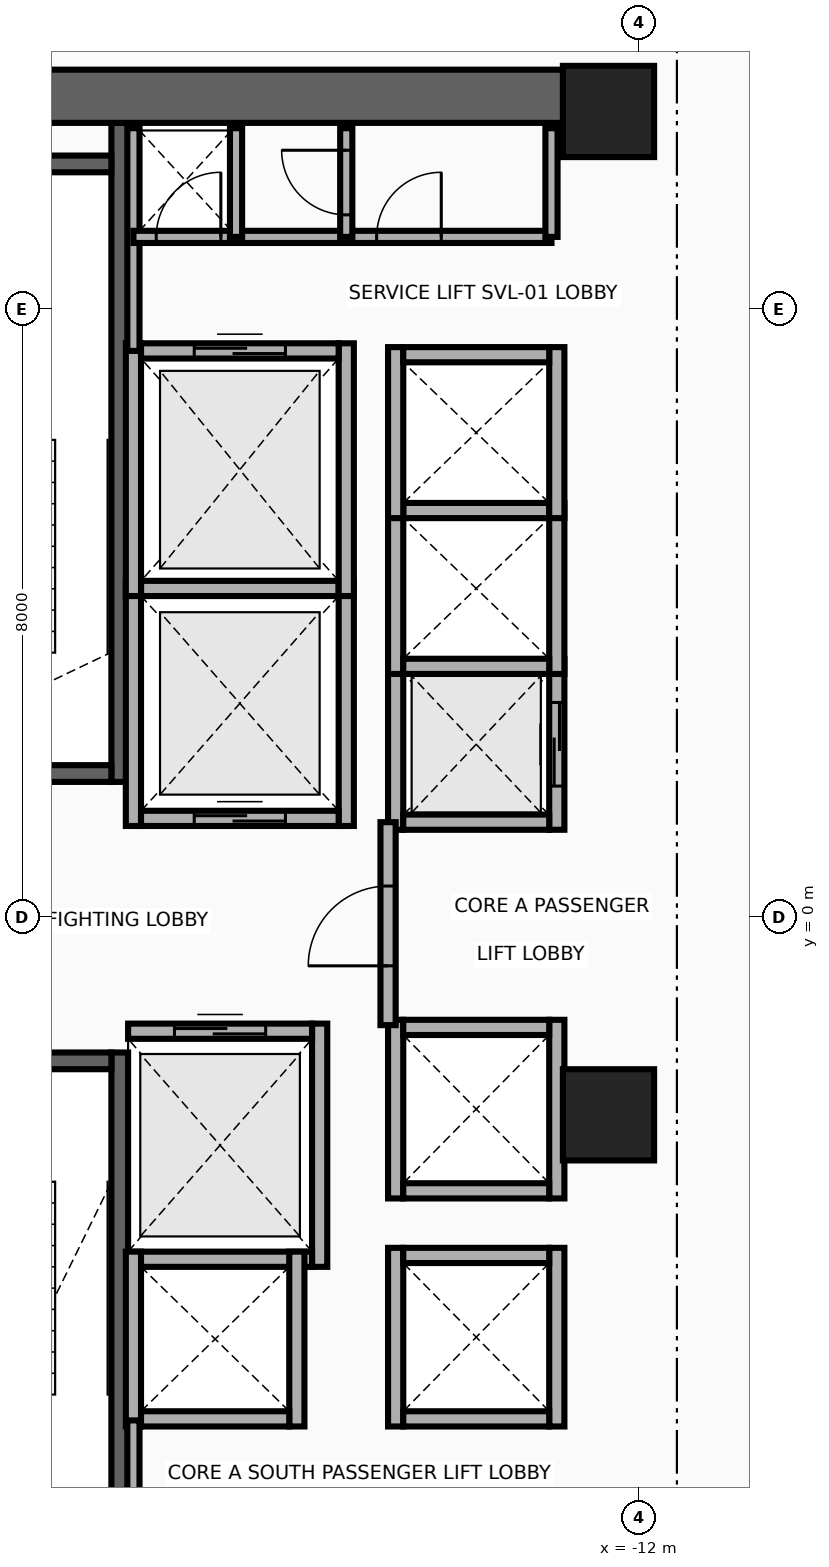
"""IFC4 building model, lengths in metres.
Left out: names, types, materials, properties, quantities, classifications, styles, units other than length and angle.
Written with IfcOpenShell. Run it as: python <this file> out.ifc"""

import sys

from ifc_helpers import new_model, si_unit, direction, frame, frame_2d, origin, origin_2d, place, context, subcontext, project, spatial, rectangle, extrude, source, transform, mapped, element, fill, save


model = new_model("IFC4")
c1 = context("Model", 3, precision=1e-05, world=origin(), true_north=direction((0.0, 1.0)))
c2 = subcontext(c1, "Body", "Model", "MODEL_VIEW")
j1 = project(units=[si_unit("LENGTHUNIT", "METRE"), si_unit("PLANEANGLEUNIT", "RADIAN")], contexts=[c1])
p1 = place(None, origin())
s1 = spatial("IfcSite", under=j1, at=p1, CompositionType="ELEMENT")
p2 = place(p1, origin())
s2 = spatial("IfcBuilding", under=s1, at=p2, CompositionType="ELEMENT")
p3 = place(p2, frame((0.0, 0.0, 105.7)))
s3 = spatial("IfcBuildingStorey", under=s2, at=p3, CompositionType="ELEMENT", Elevation=105.7)
p4 = place(p3, frame((-18.83, 1.78, 0.0), z_axis=(0.0, 0.0, 1.0), x_axis=(0.0, 1.0, 0.0)))
e1 = element("IfcWall", 1, at=p4, inside=s3, PredefinedType="SHEAR", context=c2, shape_type="SweptSolid", body=[
    extrude(rectangle(XDim=8.67, YDim=0.22, at=frame_2d((4.335, 0.0))), origin(), (0.0, 0.0, 1.0), 3.46),
])
p5 = place(p3, frame((-22.05, 1.89, 0.0), z_axis=(0.0, 0.0, 1.0), x_axis=(1.0, 0.0, 0.0)))
e2 = element("IfcWall", 2, at=p5, inside=s3, PredefinedType="SHEAR", context=c2, shape_type="SweptSolid", body=[
    extrude(rectangle(XDim=3.11, YDim=0.22, at=frame_2d((1.555, 0.0))), origin(), (0.0, 0.0, 1.0), 3.46),
])
p6 = place(p5, frame((1.0, 0.0, 0.0)))
e3 = element("IfcOpeningElement", 3, at=p6, cuts=e2, PredefinedType="OPENING", context=c2, shape_type="SweptSolid", body=[
    extrude(rectangle(XDim=1.1, YDim=2.15, at=frame_2d((0.55, 1.075))), frame((0.0, 0.125, 0.0), z_axis=(0.0, -1.0, 0.0), x_axis=(1.0, 0.0, 0.0)), (0.0, 0.0, 1.0), 0.25),
])
p7 = place(p3, frame((-22.05, 9.91, 0.0), z_axis=(0.0, 0.0, 1.0), x_axis=(1.0, 0.0, 0.0)))
e4 = element("IfcWall", 4, at=p7, inside=s3, PredefinedType="SHEAR", context=c2, shape_type="SweptSolid", body=[
    extrude(rectangle(XDim=3.11, YDim=0.22, at=frame_2d((1.555, 0.0))), origin(), (0.0, 0.0, 1.0), 3.46),
])
p8 = place(p3, frame((-18.83, -10.45, 0.0), z_axis=(0.0, 0.0, 1.0), x_axis=(0.0, 1.0, 0.0)))
e5 = element("IfcWall", 5, at=p8, inside=s3, PredefinedType="SHEAR", context=c2, shape_type="SweptSolid", body=[
    extrude(rectangle(XDim=8.67, YDim=0.22, at=frame_2d((4.335, 0.0))), origin(), (0.0, 0.0, 1.0), 3.46),
])
p9 = place(p3, frame((-22.05, -1.89, 0.0), z_axis=(0.0, 0.0, 1.0), x_axis=(1.0, 0.0, 0.0)))
e6 = element("IfcWall", 6, at=p9, inside=s3, PredefinedType="SHEAR", context=c2, shape_type="SweptSolid", body=[
    extrude(rectangle(XDim=3.11, YDim=0.22, at=frame_2d((1.555, 0.0))), origin(), (0.0, 0.0, 1.0), 3.46),
])
p10 = place(p9, frame((1.0, 0.0, 0.0)))
e7 = element("IfcOpeningElement", 7, at=p10, cuts=e6, PredefinedType="OPENING", context=c2, shape_type="SweptSolid", body=[
    extrude(rectangle(XDim=1.1, YDim=2.15, at=frame_2d((0.55, 1.075))), frame((0.0, 0.125, 0.0), z_axis=(0.0, -1.0, 0.0), x_axis=(1.0, 0.0, 0.0)), (0.0, 0.0, 1.0), 0.25),
])
p11 = place(p3, frame((-22.65, 10.8, 0.0), z_axis=(0.0, 0.0, 1.0), x_axis=(1.0, 0.0, 0.0)))
e8 = element("IfcWall", 8, at=p11, inside=s3, PredefinedType="SHEAR", context=c2, shape_type="SweptSolid", body=[
    extrude(rectangle(XDim=10.25, YDim=0.7, at=frame_2d((5.125, 0.0))), origin(), (0.0, 0.0, 1.0), 3.46),
])
m1 = source(origin(), c2, "Body", "SweptSolid", [
    extrude(rectangle(XDim=1.2, YDim=1.2, at=origin_2d()), origin(), (0.0, 0.0, 1.0), 3.7),
])
for number, where, z_axis, x_axis in (
    (9, (-12.4, -2.6, 0.0), (0.0, 0.0, 1.0), (1.0, 0.0, 0.0)),
    (10, (-12.4, 10.6, 0.0), (0.0, 0.0, 1.0), (1.0, 0.0, 0.0)),
):
    element("IfcColumn", number, at=place(p3, frame(where, z_axis=z_axis, x_axis=x_axis)), inside=s3, PredefinedType="COLUMN", context=c2, shape_type="MappedRepresentation", body=[
        mapped(m1, transform((0.0, 0.0, 0.0), x_axis=(1.0, 0.0, 0.0), y_axis=(0.0, 1.0, 0.0), z_axis=(0.0, 0.0, 1.0), scale=1.0)),
    ])
for number, where, z_axis, x_axis in (
    (11, (-18.65, 1.2, 0.0), (0.0, 0.0, 1.0), (0.0, 1.0, 0.0)),
    (12, (-15.85, 1.2, 0.0), (0.0, 0.0, 1.0), (0.0, 1.0, 0.0)),
):
    element("IfcWall", number, at=place(p3, frame(where, z_axis=z_axis, x_axis=x_axis)), inside=s3, PredefinedType="MOVABLE", context=c2, shape_type="SweptSolid", body=[
        extrude(rectangle(XDim=3.225, YDim=0.2, at=frame_2d((1.613, 0.0))), origin(), (0.0, 0.0, 1.0), 3.46),
    ])
p12 = place(p3, frame((-18.55, 1.3, 0.0), z_axis=(0.0, 0.0, 1.0), x_axis=(1.0, 0.0, 0.0)))
e13 = element("IfcWall", 13, at=p12, inside=s3, PredefinedType="MOVABLE", context=c2, shape_type="SweptSolid", body=[
    extrude(rectangle(XDim=2.6, YDim=0.2, at=frame_2d((1.3, 0.0))), origin(), (0.0, 0.0, 1.0), 3.46),
])
p13 = place(p12, frame((0.7, 0.0, 0.0)))
e14 = element("IfcOpeningElement", 14, at=p13, cuts=e13, PredefinedType="OPENING", context=c2, shape_type="SweptSolid", body=[
    extrude(rectangle(XDim=1.2, YDim=2.1, at=frame_2d((0.6, 1.05))), frame((0.0, 0.115, 0.0), z_axis=(0.0, -1.0, 0.0), x_axis=(1.0, 0.0, 0.0)), (0.0, 0.0, 1.0), 0.23),
])
p14 = place(p3, frame((-18.55, 4.325, 0.0), z_axis=(0.0, 0.0, 1.0), x_axis=(1.0, 0.0, 0.0)))
e15 = element("IfcWall", 15, at=p14, inside=s3, PredefinedType="MOVABLE", context=c2, shape_type="SweptSolid", body=[
    extrude(rectangle(XDim=2.6, YDim=0.2, at=frame_2d((1.3, 0.0))), origin(), (0.0, 0.0, 1.0), 3.46),
])
p15 = place(p3, frame((-16.2, -4.6, 0.0), z_axis=(0.0, 0.0, 1.0), x_axis=(0.0, 1.0, 0.0)))
e16 = element("IfcWall", 16, at=p15, inside=s3, PredefinedType="MOVABLE", context=c2, shape_type="SweptSolid", body=[
    extrude(rectangle(XDim=3.2, YDim=0.2, at=frame_2d((1.6, 0.0))), origin(), (0.0, 0.0, 1.0), 3.46),
])
p16 = place(p3, frame((-18.72, -4.5, 0.0), z_axis=(0.0, 0.0, 1.0), x_axis=(1.0, 0.0, 0.0)))
e17 = element("IfcWall", 17, at=p16, inside=s3, PredefinedType="MOVABLE", context=c2, shape_type="SweptSolid", body=[
    extrude(rectangle(XDim=2.42, YDim=0.2, at=frame_2d((1.21, 0.0))), origin(), (0.0, 0.0, 1.0), 3.46),
])
p17 = place(p3, frame((-18.72, -1.5, 0.0), z_axis=(0.0, 0.0, 1.0), x_axis=(1.0, 0.0, 0.0)))
e18 = element("IfcWall", 18, at=p17, inside=s3, PredefinedType="MOVABLE", context=c2, shape_type="SweptSolid", body=[
    extrude(rectangle(XDim=2.42, YDim=0.2, at=frame_2d((1.21, 0.0))), origin(), (0.0, 0.0, 1.0), 3.46),
])
p18 = place(p17, frame((0.61, 0.0, 0.0)))
e19 = element("IfcOpeningElement", 19, at=p18, cuts=e18, PredefinedType="OPENING", context=c2, shape_type="SweptSolid", body=[
    extrude(rectangle(XDim=1.2, YDim=2.1, at=frame_2d((0.6, 1.05))), frame((0.0, 0.115, 0.0), z_axis=(0.0, -1.0, 0.0), x_axis=(1.0, 0.0, 0.0)), (0.0, 0.0, 1.0), 0.23),
])
for number, where, z_axis, x_axis in (
    (20, (-18.65, 4.225, 0.0), (0.0, 0.0, 1.0), (0.0, 1.0, 0.0)),
    (21, (-15.85, 4.225, 0.0), (0.0, 0.0, 1.0), (0.0, 1.0, 0.0)),
):
    element("IfcWall", number, at=place(p3, frame(where, z_axis=z_axis, x_axis=x_axis)), inside=s3, PredefinedType="MOVABLE", context=c2, shape_type="SweptSolid", body=[
        extrude(rectangle(XDim=3.325, YDim=0.2, at=frame_2d((1.663, 0.0))), origin(), (0.0, 0.0, 1.0), 3.46),
    ])
p19 = place(p3, frame((-18.55, 7.45, 0.0), z_axis=(0.0, 0.0, 1.0), x_axis=(1.0, 0.0, 0.0)))
e22 = element("IfcWall", 22, at=p19, inside=s3, PredefinedType="MOVABLE", context=c2, shape_type="SweptSolid", body=[
    extrude(rectangle(XDim=2.6, YDim=0.2, at=frame_2d((1.3, 0.0))), origin(), (0.0, 0.0, 1.0), 3.46),
])
p20 = place(p19, frame((0.7, 0.0, 0.0)))
e23 = element("IfcOpeningElement", 23, at=p20, cuts=e22, PredefinedType="OPENING", context=c2, shape_type="SweptSolid", body=[
    extrude(rectangle(XDim=1.2, YDim=2.1, at=frame_2d((0.6, 1.05))), frame((0.0, 0.115, 0.0), z_axis=(0.0, -1.0, 0.0), x_axis=(1.0, 0.0, 0.0)), (0.0, 0.0, 1.0), 0.23),
])
for number, where, z_axis, x_axis in (
    (24, (-15.2, -6.7, 0.0), (0.0, 0.0, 1.0), (0.0, 1.0, 0.0)),
    (25, (-13.08, -6.7, 0.0), (0.0, 0.0, 1.0), (0.0, 1.0, 0.0)),
):
    element("IfcWall", number, at=place(p3, frame(where, z_axis=z_axis, x_axis=x_axis)), inside=s3, PredefinedType="MOVABLE", context=c2, shape_type="SweptSolid", body=[
        extrude(rectangle(XDim=2.35, YDim=0.2, at=frame_2d((1.175, 0.0))), origin(), (0.0, 0.0, 1.0), 3.46),
    ])
for number, where, z_axis, x_axis in (
    (26, (-15.1, -6.6, 0.0), (0.0, 0.0, 1.0), (1.0, 0.0, 0.0)),
    (27, (-15.1, -4.45, 0.0), (0.0, 0.0, 1.0), (1.0, 0.0, 0.0)),
):
    element("IfcWall", number, at=place(p3, frame(where, z_axis=z_axis, x_axis=x_axis)), inside=s3, PredefinedType="MOVABLE", context=c2, shape_type="SweptSolid", body=[
        extrude(rectangle(XDim=1.92, YDim=0.2, at=frame_2d((0.96, 0.0))), origin(), (0.0, 0.0, 1.0), 3.46),
    ])
p21 = place(p3, frame((-15.2, 1.15, 0.0), z_axis=(0.0, 0.0, 1.0), x_axis=(0.0, 1.0, 0.0)))
e28 = element("IfcWall", 28, at=p21, inside=s3, PredefinedType="MOVABLE", context=c2, shape_type="SweptSolid", body=[
    extrude(rectangle(XDim=2.25, YDim=0.2, at=frame_2d((1.125, 0.0))), origin(), (0.0, 0.0, 1.0), 3.46),
])
p22 = place(p3, frame((-13.08, 1.15, 0.0), z_axis=(0.0, 0.0, 1.0), x_axis=(0.0, 1.0, 0.0)))
e29 = element("IfcWall", 29, at=p22, inside=s3, PredefinedType="MOVABLE", context=c2, shape_type="SweptSolid", body=[
    extrude(rectangle(XDim=2.25, YDim=0.2, at=frame_2d((1.125, 0.0))), origin(), (0.0, 0.0, 1.0), 3.46),
])
p23 = place(p22, frame((0.575, 0.0, 0.0)))
e30 = element("IfcOpeningElement", 30, at=p23, cuts=e29, PredefinedType="OPENING", context=c2, shape_type="SweptSolid", body=[
    extrude(rectangle(XDim=1.1, YDim=2.1, at=frame_2d((0.55, 1.05))), frame((0.0, 0.115, 0.0), z_axis=(0.0, -1.0, 0.0), x_axis=(1.0, 0.0, 0.0)), (0.0, 0.0, 1.0), 0.23),
])
p24 = place(p3, frame((-15.1, 1.25, 0.0), z_axis=(0.0, 0.0, 1.0), x_axis=(1.0, 0.0, 0.0)))
e31 = element("IfcWall", 31, at=p24, inside=s3, PredefinedType="MOVABLE", context=c2, shape_type="SweptSolid", body=[
    extrude(rectangle(XDim=1.92, YDim=0.2, at=frame_2d((0.96, 0.0))), origin(), (0.0, 0.0, 1.0), 3.46),
])
for number, where, z_axis, x_axis in (
    (32, (-15.2, 3.2, 0.0), (0.0, 0.0, 1.0), (0.0, 1.0, 0.0)),
    (33, (-13.08, 3.2, 0.0), (0.0, 0.0, 1.0), (0.0, 1.0, 0.0)),
):
    element("IfcWall", number, at=place(p3, frame(where, z_axis=z_axis, x_axis=x_axis)), inside=s3, PredefinedType="MOVABLE", context=c2, shape_type="SweptSolid", body=[
        extrude(rectangle(XDim=2.25, YDim=0.2, at=frame_2d((1.125, 0.0))), origin(), (0.0, 0.0, 1.0), 3.46),
    ])
for number, where, z_axis, x_axis in (
    (34, (-15.1, 3.3, 0.0), (0.0, 0.0, 1.0), (1.0, 0.0, 0.0)),
    (35, (-15.1, 5.35, 0.0), (0.0, 0.0, 1.0), (1.0, 0.0, 0.0)),
):
    element("IfcWall", number, at=place(p3, frame(where, z_axis=z_axis, x_axis=x_axis)), inside=s3, PredefinedType="MOVABLE", context=c2, shape_type="SweptSolid", body=[
        extrude(rectangle(XDim=1.92, YDim=0.2, at=frame_2d((0.96, 0.0))), origin(), (0.0, 0.0, 1.0), 3.46),
    ])
for number, where, z_axis, x_axis in (
    (36, (-15.2, 5.25, 0.0), (0.0, 0.0, 1.0), (0.0, 1.0, 0.0)),
    (37, (-13.08, 5.25, 0.0), (0.0, 0.0, 1.0), (0.0, 1.0, 0.0)),
):
    element("IfcWall", number, at=place(p3, frame(where, z_axis=z_axis, x_axis=x_axis)), inside=s3, PredefinedType="MOVABLE", context=c2, shape_type="SweptSolid", body=[
        extrude(rectangle(XDim=2.25, YDim=0.2, at=frame_2d((1.125, 0.0))), origin(), (0.0, 0.0, 1.0), 3.46),
    ])
p25 = place(p3, frame((-15.1, 7.4, 0.0), z_axis=(0.0, 0.0, 1.0), x_axis=(1.0, 0.0, 0.0)))
e38 = element("IfcWall", 38, at=p25, inside=s3, PredefinedType="MOVABLE", context=c2, shape_type="SweptSolid", body=[
    extrude(rectangle(XDim=1.92, YDim=0.2, at=frame_2d((0.96, 0.0))), origin(), (0.0, 0.0, 1.0), 3.46),
])
for number, where, z_axis, x_axis in (
    (39, (-18.65, -6.7, 0.0), (0.0, 0.0, 1.0), (0.0, 1.0, 0.0)),
    (40, (-16.5, -6.7, 0.0), (0.0, 0.0, 1.0), (0.0, 1.0, 0.0)),
):
    element("IfcWall", number, at=place(p3, frame(where, z_axis=z_axis, x_axis=x_axis)), inside=s3, PredefinedType="MOVABLE", context=c2, shape_type="SweptSolid", body=[
        extrude(rectangle(XDim=2.3, YDim=0.2, at=frame_2d((1.15, 0.0))), origin(), (0.0, 0.0, 1.0), 3.46),
    ])
p26 = place(p3, frame((-18.55, -6.6, 0.0), z_axis=(0.0, 0.0, 1.0), x_axis=(1.0, 0.0, 0.0)))
e41 = element("IfcWall", 41, at=p26, inside=s3, PredefinedType="MOVABLE", context=c2, shape_type="SweptSolid", body=[
    extrude(rectangle(XDim=1.95, YDim=0.2, at=frame_2d((0.975, 0.0))), origin(), (0.0, 0.0, 1.0), 3.46),
])
for number, where, z_axis, x_axis in (
    (42, (-15.2, -3.7, 0.0), (0.0, 0.0, 1.0), (0.0, 1.0, 0.0)),
    (43, (-13.08, -3.7, 0.0), (0.0, 0.0, 1.0), (0.0, 1.0, 0.0)),
):
    element("IfcWall", number, at=place(p3, frame(where, z_axis=z_axis, x_axis=x_axis)), inside=s3, PredefinedType="MOVABLE", context=c2, shape_type="SweptSolid", body=[
        extrude(rectangle(XDim=2.35, YDim=0.2, at=frame_2d((1.175, 0.0))), origin(), (0.0, 0.0, 1.0), 3.46),
    ])
for number, where, z_axis, x_axis in (
    (44, (-15.1, -3.6, 0.0), (0.0, 0.0, 1.0), (1.0, 0.0, 0.0)),
    (45, (-15.1, -1.45, 0.0), (0.0, 0.0, 1.0), (1.0, 0.0, 0.0)),
):
    element("IfcWall", number, at=place(p3, frame(where, z_axis=z_axis, x_axis=x_axis)), inside=s3, PredefinedType="MOVABLE", context=c2, shape_type="SweptSolid", body=[
        extrude(rectangle(XDim=1.92, YDim=0.2, at=frame_2d((0.96, 0.0))), origin(), (0.0, 0.0, 1.0), 3.46),
    ])
p27 = place(p3, frame((-15.3, -1.42, 0.0), z_axis=(0.0, 0.0, 1.0), x_axis=(0.0, 1.0, 0.0)))
e46 = element("IfcWall", 46, at=p27, inside=s3, PredefinedType="PARTITIONING", context=c2, shape_type="SweptSolid", body=[
    extrude(rectangle(XDim=2.67, YDim=0.2, at=frame_2d((1.335, 0.0))), origin(), (0.0, 0.0, 1.0), 3.46),
])
p28 = place(p27, frame((0.78, 0.0, 0.0)))
e47 = element("IfcOpeningElement", 47, at=p28, cuts=e46, PredefinedType="OPENING", context=c2, shape_type="SweptSolid", body=[
    extrude(rectangle(XDim=1.05, YDim=2.15, at=frame_2d((0.525, 1.075))), frame((0.0, 0.115, 0.0), z_axis=(0.0, -1.0, 0.0), x_axis=(1.0, 0.0, 0.0)), (0.0, 0.0, 1.0), 0.23),
])
p29 = place(p3, frame((-18.65, 7.45, 0.0), z_axis=(0.0, 0.0, 1.0), x_axis=(0.0, 1.0, 0.0)))
e48 = element("IfcWall", 48, at=p29, inside=s3, PredefinedType="PARTITIONING", context=c2, shape_type="SweptSolid", body=[
    extrude(rectangle(XDim=2.93, YDim=0.16, at=frame_2d((1.465, 0.0))), origin(), (0.0, 0.0, 1.0), 3.46),
])
p30 = place(p3, frame((-18.65, -8.18, 0.0), z_axis=(0.0, 0.0, 1.0), x_axis=(0.0, 1.0, 0.0)))
e49 = element("IfcWall", 49, at=p30, inside=s3, PredefinedType="PARTITIONING", context=c2, shape_type="SweptSolid", body=[
    extrude(rectangle(XDim=1.56, YDim=0.16, at=frame_2d((0.78, 0.0))), origin(), (0.0, 0.0, 1.0), 3.46),
])
p31 = place(p3, frame((-18.65, 8.95, 0.0), z_axis=(0.0, 0.0, 1.0), x_axis=(1.0, 0.0, 0.0)))
e50 = element("IfcWall", 50, at=p31, inside=s3, PredefinedType="PARTITIONING", context=c2, shape_type="SweptSolid", body=[
    extrude(rectangle(XDim=5.5, YDim=0.16, at=frame_2d((2.75, 0.0))), origin(), (0.0, 0.0, 1.0), 3.46),
])
p32 = place(p31, frame((0.3, 0.0, 0.0)))
e51 = element("IfcOpeningElement", 51, at=p32, cuts=e50, PredefinedType="OPENING", context=c2, shape_type="SweptSolid", body=[
    extrude(rectangle(XDim=0.85, YDim=2.05, at=frame_2d((0.425, 1.025))), frame((0.0, 0.095, 0.0), z_axis=(0.0, -1.0, 0.0), x_axis=(1.0, 0.0, 0.0)), (0.0, 0.0, 1.0), 0.19),
])
p33 = place(p31, frame((3.2, 0.0, 0.0)))
e52 = element("IfcOpeningElement", 52, at=p33, cuts=e50, PredefinedType="OPENING", context=c2, shape_type="SweptSolid", body=[
    extrude(rectangle(XDim=0.85, YDim=2.05, at=frame_2d((0.425, 1.025))), frame((0.0, 0.095, 0.0), z_axis=(0.0, -1.0, 0.0), x_axis=(1.0, 0.0, 0.0)), (0.0, 0.0, 1.0), 0.19),
])
for number, where, z_axis, x_axis in (
    (53, (-13.15, 8.95, 0.0), (0.0, 0.0, 1.0), (0.0, 1.0, 0.0)),
    (54, (-17.3, 8.95, 0.0), (0.0, 0.0, 1.0), (0.0, 1.0, 0.0)),
):
    element("IfcWall", number, at=place(p3, frame(where, z_axis=z_axis, x_axis=x_axis)), inside=s3, PredefinedType="PARTITIONING", context=c2, shape_type="SweptSolid", body=[
        extrude(rectangle(XDim=1.43, YDim=0.16, at=frame_2d((0.715, 0.0))), origin(), (0.0, 0.0, 1.0), 3.46),
    ])
p34 = place(p3, frame((-15.85, 8.95, 0.0), z_axis=(0.0, 0.0, 1.0), x_axis=(0.0, 1.0, 0.0)))
e55 = element("IfcWall", 55, at=p34, inside=s3, PredefinedType="PARTITIONING", context=c2, shape_type="SweptSolid", body=[
    extrude(rectangle(XDim=1.43, YDim=0.16, at=frame_2d((0.715, 0.0))), origin(), (0.0, 0.0, 1.0), 3.46),
])
p35 = place(p34, frame((0.29, 0.0, 0.0)))
e56 = element("IfcOpeningElement", 56, at=p35, cuts=e55, PredefinedType="OPENING", context=c2, shape_type="SweptSolid", body=[
    extrude(rectangle(XDim=0.85, YDim=2.05, at=frame_2d((0.425, 1.025))), frame((0.0, 0.095, 0.0), z_axis=(0.0, -1.0, 0.0), x_axis=(1.0, 0.0, 0.0)), (0.0, 0.0, 1.0), 0.19),
])
p36 = place(p13, origin())
e57 = element("IfcDoor", 57, at=p36, inside=s3, OperationType="DOUBLE_DOOR_SLIDING", PredefinedType="DOOR", context=c2, shape_type="SweptSolid", body=[
    extrude(rectangle(XDim=1.2, YDim=2.1, at=frame_2d((0.6, 1.05))), frame((0.0, 0.025, 0.0), z_axis=(0.0, -1.0, 0.0), x_axis=(1.0, 0.0, 0.0)), (0.0, 0.0, 1.0), 0.05),
])
fill(e14, e57)
p37 = place(p18, origin())
e58 = element("IfcDoor", 58, at=p37, inside=s3, OperationType="DOUBLE_DOOR_SLIDING", PredefinedType="DOOR", context=c2, shape_type="SweptSolid", body=[
    extrude(rectangle(XDim=1.2, YDim=2.1, at=frame_2d((0.6, 1.05))), frame((0.0, 0.025, 0.0), z_axis=(0.0, -1.0, 0.0), x_axis=(1.0, 0.0, 0.0)), (0.0, 0.0, 1.0), 0.05),
])
fill(e19, e58)
p38 = place(p20, origin())
e59 = element("IfcDoor", 59, at=p38, inside=s3, OperationType="DOUBLE_DOOR_SLIDING", PredefinedType="DOOR", context=c2, shape_type="SweptSolid", body=[
    extrude(rectangle(XDim=1.2, YDim=2.1, at=frame_2d((0.6, 1.05))), frame((0.0, 0.025, 0.0), z_axis=(0.0, -1.0, 0.0), x_axis=(1.0, 0.0, 0.0)), (0.0, 0.0, 1.0), 0.05),
])
fill(e23, e59)
p39 = place(p23, origin())
e60 = element("IfcDoor", 60, at=p39, inside=s3, OperationType="DOUBLE_DOOR_SLIDING", PredefinedType="DOOR", context=c2, shape_type="SweptSolid", body=[
    extrude(rectangle(XDim=1.1, YDim=2.1, at=frame_2d((0.55, 1.05))), frame((0.0, 0.025, 0.0), z_axis=(0.0, -1.0, 0.0), x_axis=(1.0, 0.0, 0.0)), (0.0, 0.0, 1.0), 0.05),
])
fill(e30, e60)
p40 = place(p28, origin())
e61 = element("IfcDoor", 61, at=p40, inside=s3, OperationType="SINGLE_SWING_RIGHT", PredefinedType="DOOR", context=c2, shape_type="SweptSolid", body=[
    extrude(rectangle(XDim=1.05, YDim=2.15, at=frame_2d((0.525, 1.075))), frame((0.0, 0.025, 0.0), z_axis=(0.0, -1.0, 0.0), x_axis=(1.0, 0.0, 0.0)), (0.0, 0.0, 1.0), 0.05),
])
fill(e47, e61)
p41 = place(p32, origin())
e62 = element("IfcDoor", 62, at=p41, inside=s3, OperationType="SINGLE_SWING_LEFT", PredefinedType="DOOR", context=c2, shape_type="SweptSolid", body=[
    extrude(rectangle(XDim=0.85, YDim=2.05, at=frame_2d((0.425, 1.025))), frame((0.0, 0.025, 0.0), z_axis=(0.0, -1.0, 0.0), x_axis=(1.0, 0.0, 0.0)), (0.0, 0.0, 1.0), 0.05),
])
fill(e51, e62)
p42 = place(p33, origin())
e63 = element("IfcDoor", 63, at=p42, inside=s3, OperationType="SINGLE_SWING_RIGHT", PredefinedType="DOOR", context=c2, shape_type="SweptSolid", body=[
    extrude(rectangle(XDim=0.85, YDim=2.05, at=frame_2d((0.425, 1.025))), frame((0.0, 0.025, 0.0), z_axis=(0.0, -1.0, 0.0), x_axis=(1.0, 0.0, 0.0)), (0.0, 0.0, 1.0), 0.05),
])
fill(e52, e63)
p43 = place(p35, origin())
e64 = element("IfcDoor", 64, at=p43, inside=s3, OperationType="SINGLE_SWING_LEFT", PredefinedType="DOOR", context=c2, shape_type="SweptSolid", body=[
    extrude(rectangle(XDim=0.85, YDim=2.05, at=frame_2d((0.425, 1.025))), frame((0.0, 0.025, 0.0), z_axis=(0.0, -1.0, 0.0), x_axis=(1.0, 0.0, 0.0)), (0.0, 0.0, 1.0), 0.05),
])
fill(e56, e64)
save(model, sys.argv[1])
